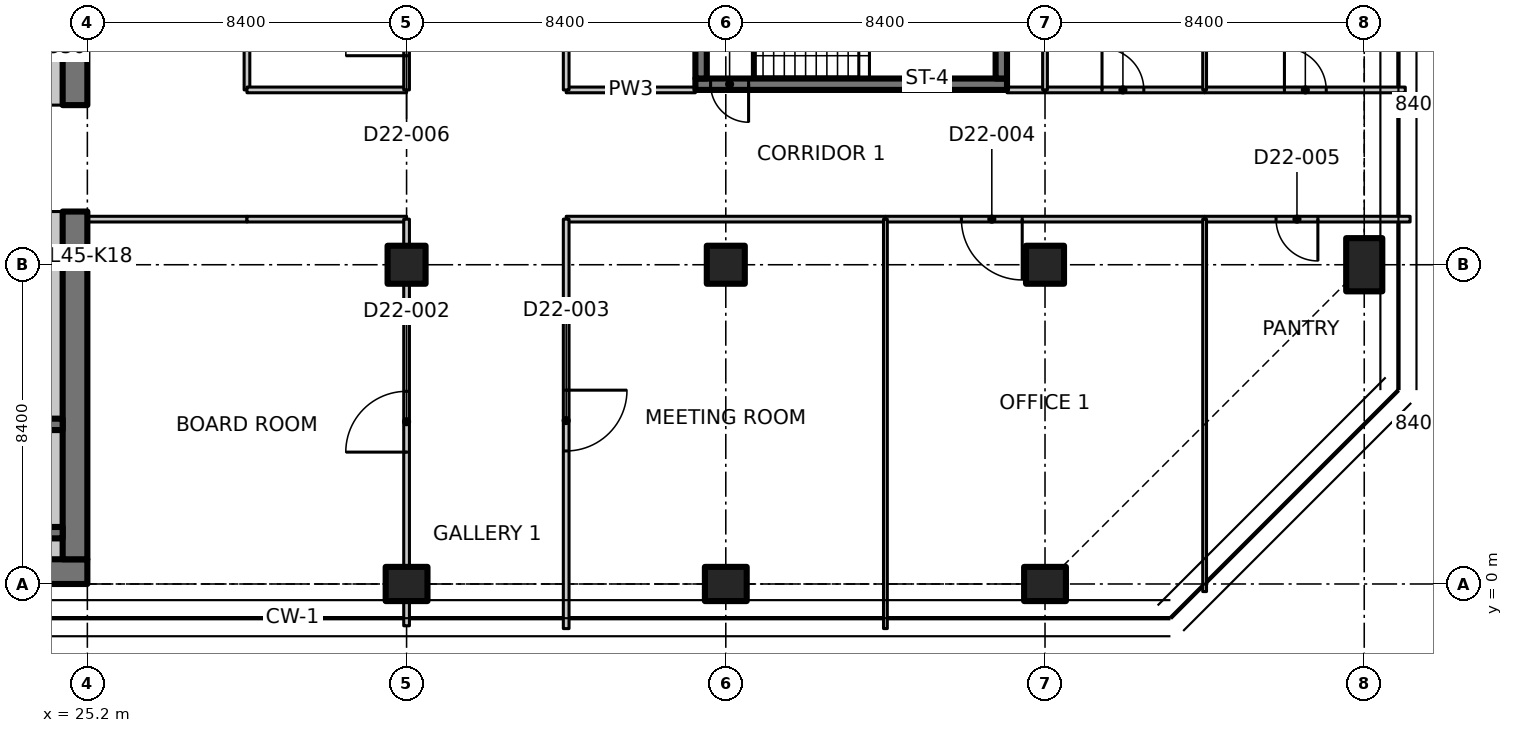
"""IFC4 building model, lengths in metres.
Left out: names, types, materials, properties, quantities, classifications, styles, units other than length and angle.
Written with IfcOpenShell. Run it as: python <this file> out.ifc"""

import sys

from ifc_helpers import new_model, si_unit, direction, frame, frame_2d, origin, origin_2d, place, context, subcontext, project, spatial, polyline, rectangle, outline, extrude, element, fill, save


model = new_model("IFC4")
c1 = context("Model", 3, precision=1e-05, world=origin(), true_north=direction((0.0, 1.0)))
c2 = subcontext(c1, "Body", "Model", "MODEL_VIEW")
j1 = project(units=[si_unit("LENGTHUNIT", "METRE"), si_unit("PLANEANGLEUNIT", "RADIAN")], contexts=[c1])
p1 = place(None, origin())
s1 = spatial("IfcSite", under=j1, at=p1, CompositionType="ELEMENT")
p2 = place(p1, origin())
s2 = spatial("IfcBuilding", under=s1, at=p2, CompositionType="ELEMENT")
p3 = place(p2, frame((0.0, 0.0, 181.2)))
s3 = spatial("IfcBuildingStorey", under=s2, at=p3, CompositionType="ELEMENT", Elevation=181.2)
p4 = place(p3, frame((33.6, 0.0, 0.0), z_axis=(0.0, 0.0, 1.0), x_axis=(0.0, 1.0, 0.0)))
e1 = element("IfcColumn", 1, at=p4, inside=s3, PredefinedType="COLUMN", context=c2, shape_type="SweptSolid", body=[
    extrude(rectangle(XDim=0.9, YDim=1.1, at=origin_2d()), origin(), (0.0, 0.0, 1.0), 3.35),
])
p5 = place(p3, frame((33.6, 8.4, 0.0), z_axis=(0.0, 0.0, 1.0), x_axis=(1.0, 0.0, 0.0)))
e2 = element("IfcColumn", 2, at=p5, inside=s3, PredefinedType="COLUMN", context=c2, shape_type="SweptSolid", body=[
    extrude(rectangle(XDim=1.0, YDim=1.0, at=origin_2d()), origin(), (0.0, 0.0, 1.0), 3.35),
])
p6 = place(p3, frame((42.0, 0.0, 0.0), z_axis=(0.0, 0.0, 1.0), x_axis=(0.0, 1.0, 0.0)))
e3 = element("IfcColumn", 3, at=p6, inside=s3, PredefinedType="COLUMN", context=c2, shape_type="SweptSolid", body=[
    extrude(rectangle(XDim=0.9, YDim=1.1, at=origin_2d()), origin(), (0.0, 0.0, 1.0), 3.35),
])
p7 = place(p3, frame((42.0, 8.4, 0.0), z_axis=(0.0, 0.0, 1.0), x_axis=(1.0, 0.0, 0.0)))
e4 = element("IfcColumn", 4, at=p7, inside=s3, PredefinedType="COLUMN", context=c2, shape_type="SweptSolid", body=[
    extrude(rectangle(XDim=1.0, YDim=1.0, at=origin_2d()), origin(), (0.0, 0.0, 1.0), 3.35),
])
p8 = place(p3, frame((50.4, 0.0, 0.0), z_axis=(0.0, 0.0, 1.0), x_axis=(0.0, 1.0, 0.0)))
e5 = element("IfcColumn", 5, at=p8, inside=s3, PredefinedType="COLUMN", context=c2, shape_type="SweptSolid", body=[
    extrude(rectangle(XDim=0.9, YDim=1.1, at=origin_2d()), origin(), (0.0, 0.0, 1.0), 3.35),
])
p9 = place(p3, frame((50.4, 8.4, 0.0), z_axis=(0.0, 0.0, 1.0), x_axis=(1.0, 0.0, 0.0)))
e6 = element("IfcColumn", 6, at=p9, inside=s3, PredefinedType="COLUMN", context=c2, shape_type="SweptSolid", body=[
    extrude(rectangle(XDim=1.0, YDim=1.0, at=origin_2d()), origin(), (0.0, 0.0, 1.0), 3.35),
])
p10 = place(p3, frame((58.8, 8.4, 0.0), z_axis=(0.0, 0.0, 1.0), x_axis=(1.0, 0.0, 0.0)))
e7 = element("IfcColumn", 7, at=p10, inside=s3, PredefinedType="COLUMN", context=c2, shape_type="SweptSolid", body=[
    extrude(rectangle(XDim=0.95, YDim=1.4, at=origin_2d()), origin(), (0.0, 0.0, 1.0), 3.35),
])
p11 = place(p3, frame((7.286, 0.325, 0.0), z_axis=(0.0, 0.0, 1.0), x_axis=(1.0, 0.0, 0.0)))
e8 = element("IfcWall", 8, at=p11, inside=s3, PredefinedType="SHEAR", context=c2, shape_type="SweptSolid", body=[
    extrude(rectangle(XDim=17.914, YDim=0.65, at=frame_2d((8.957, 0.0))), origin(), (0.0, 0.0, 1.0), 3.35),
])
p12 = place(p3, frame((24.875, 0.65, 0.0), z_axis=(0.0, 0.0, 1.0), x_axis=(0.0, 1.0, 0.0)))
e9 = element("IfcWall", 9, at=p12, inside=s3, PredefinedType="SHEAR", context=c2, shape_type="SweptSolid", body=[
    extrude(rectangle(XDim=9.15, YDim=0.65, at=frame_2d((4.575, 0.0))), origin(), (0.0, 0.0, 1.0), 3.35),
])
p13 = place(p3, frame((24.875, 12.6, 0.0), z_axis=(0.0, 0.0, 1.0), x_axis=(0.0, 1.0, 0.0)))
e10 = element("IfcWall", 10, at=p13, inside=s3, PredefinedType="SHEAR", context=c2, shape_type="SweptSolid", body=[
    extrude(rectangle(XDim=3.55, YDim=0.65, at=frame_2d((1.775, 0.0))), origin(), (0.0, 0.0, 1.0), 3.35),
])
p14 = place(p3, frame((24.275, 12.6, 0.0), z_axis=(0.0, 0.0, 1.0), x_axis=(0.0, 1.0, 0.0)))
e11 = element("IfcWall", 11, at=p14, inside=s3, PredefinedType="PARTITIONING", context=c2, shape_type="SweptSolid", body=[
    extrude(rectangle(XDim=3.0, YDim=0.55, at=frame_2d((1.5, 0.0))), origin(), (0.0, 0.0, 1.0), 3.35),
])
p15 = place(p3, frame((15.8, 1.35, 0.0), z_axis=(0.0, 0.0, 1.0), x_axis=(1.0, 0.0, 0.0)))
e12 = element("IfcWall", 12, at=p15, inside=s3, PredefinedType="SHEAR", context=c2, shape_type="SweptSolid", body=[
    extrude(rectangle(XDim=8.75, YDim=0.3, at=frame_2d((4.375, 0.0))), origin(), (0.0, 0.0, 1.0), 3.35),
])
p16 = place(p3, frame((15.8, 4.2, 0.0), z_axis=(0.0, 0.0, 1.0), x_axis=(1.0, 0.0, 0.0)))
e13 = element("IfcWall", 13, at=p16, inside=s3, PredefinedType="SHEAR", context=c2, shape_type="SweptSolid", body=[
    extrude(rectangle(XDim=8.75, YDim=0.3, at=frame_2d((4.375, 0.0))), origin(), (0.0, 0.0, 1.0), 3.35),
])
p17 = place(p16, frame((0.4, 0.0, 0.0)))
e14 = element("IfcOpeningElement", 14, at=p17, cuts=e13, PredefinedType="OPENING", context=c2, shape_type="SweptSolid", body=[
    extrude(rectangle(XDim=1.0, YDim=2.1, at=frame_2d((0.5, 1.05))), frame((0.0, 0.16, 0.0), z_axis=(0.0, -1.0, 0.0), x_axis=(1.0, 0.0, 0.0)), (0.0, 0.0, 1.0), 0.32),
])
p18 = place(p3, frame((49.4, 13.15, 0.0), z_axis=(0.0, 0.0, 1.0), x_axis=(-1.0, 0.0, 0.0)))
e15 = element("IfcWall", 15, at=p18, inside=s3, PredefinedType="SHEAR", context=c2, shape_type="SweptSolid", body=[
    extrude(rectangle(XDim=8.2, YDim=0.3, at=frame_2d((4.1, 0.0))), origin(), (0.0, 0.0, 1.0), 3.35),
])
p19 = place(p18, frame((6.8, 0.0, 0.0)))
e16 = element("IfcOpeningElement", 16, at=p19, cuts=e15, PredefinedType="OPENING", context=c2, shape_type="SweptSolid", body=[
    extrude(rectangle(XDim=1.0, YDim=2.1, at=frame_2d((0.5, 1.05))), frame((0.0, 0.16, 0.0), z_axis=(0.0, -1.0, 0.0), x_axis=(1.0, 0.0, 0.0)), (0.0, 0.0, 1.0), 0.32),
])
for number, where, z_axis, x_axis in (
    (17, (41.35, 13.3, 0.0), (0.0, 0.0, 1.0), (0.0, 1.0, 0.0)),
    (18, (49.25, 13.3, 0.0), (0.0, 0.0, 1.0), (0.0, 1.0, 0.0)),
):
    element("IfcWall", number, at=place(p3, frame(where, z_axis=z_axis, x_axis=x_axis)), inside=s3, PredefinedType="SHEAR", context=c2, shape_type="SweptSolid", body=[
        extrude(rectangle(XDim=2.55, YDim=0.3, at=frame_2d((1.275, 0.0))), origin(), (0.0, 0.0, 1.0), 3.35),
    ])
p20 = place(p3, frame((13.35, 0.925, 0.0), z_axis=(0.0, 0.0, 1.0), x_axis=(1.0, 0.0, 0.0)))
e19 = element("IfcWall", 19, at=p20, inside=s3, PredefinedType="PARTITIONING", context=c2, shape_type="SweptSolid", body=[
    extrude(rectangle(XDim=11.2, YDim=0.55, at=frame_2d((5.6, 0.0))), origin(), (0.0, 0.0, 1.0), 3.35),
])
p21 = place(p3, frame((24.275, 1.5, 0.0), z_axis=(0.0, 0.0, 1.0), x_axis=(0.0, 1.0, 0.0)))
e20 = element("IfcWall", 20, at=p21, inside=s3, PredefinedType="PARTITIONING", context=c2, shape_type="SweptSolid", body=[
    extrude(rectangle(XDim=2.55, YDim=0.55, at=frame_2d((1.275, 0.0))), origin(), (0.0, 0.0, 1.0), 3.35),
])
p22 = place(p3, frame((24.275, 4.35, 0.0), z_axis=(0.0, 0.0, 1.0), x_axis=(0.0, 1.0, 0.0)))
e21 = element("IfcWall", 21, at=p22, inside=s3, PredefinedType="PARTITIONING", context=c2, shape_type="SweptSolid", body=[
    extrude(rectangle(XDim=5.45, YDim=0.55, at=frame_2d((2.725, 0.0))), origin(), (0.0, 0.0, 1.0), 3.35),
])
p23 = place(p3, frame((29.4, 9.6, 0.0), z_axis=(0.0, 0.0, 1.0), x_axis=(-1.0, 0.0, 0.0)))
e22 = element("IfcWall", 22, at=p23, inside=s3, PredefinedType="PARTITIONING", context=c2, shape_type="SweptSolid", body=[
    extrude(rectangle(XDim=4.2, YDim=0.15, at=frame_2d((2.1, 0.0))), origin(), (0.0, 0.0, 1.0), 3.33),
])
p24 = place(p3, frame((29.4, 21.2, 0.0), z_axis=(0.0, 0.0, 1.0), x_axis=(0.0, -1.0, 0.0)))
e23 = element("IfcWall", 23, at=p24, inside=s3, PredefinedType="PARTITIONING", context=c2, shape_type="SweptSolid", body=[
    extrude(rectangle(XDim=8.2, YDim=0.15, at=frame_2d((4.1, 0.0))), origin(), (0.0, 0.0, 1.0), 3.33),
])
p25 = place(p3, frame((33.6, 9.6, 0.0), z_axis=(0.0, 0.0, 1.0), x_axis=(-1.0, 0.0, 0.0)))
e24 = element("IfcWall", 24, at=p25, inside=s3, PredefinedType="PARTITIONING", context=c2, shape_type="SweptSolid", body=[
    extrude(rectangle(XDim=4.2, YDim=0.15, at=frame_2d((2.1, 0.0))), origin(), (0.0, 0.0, 1.0), 3.33),
])
p26 = place(p3, frame((46.2, 9.6, 0.0), z_axis=(0.0, 0.0, 1.0), x_axis=(-1.0, 0.0, 0.0)))
e25 = element("IfcWall", 25, at=p26, inside=s3, PredefinedType="PARTITIONING", context=c2, shape_type="SweptSolid", body=[
    extrude(rectangle(XDim=8.4, YDim=0.15, at=frame_2d((4.2, 0.0))), origin(), (0.0, 0.0, 1.0), 3.33),
])
p27 = place(p3, frame((54.6, 9.6, 0.0), z_axis=(0.0, 0.0, 1.0), x_axis=(-1.0, 0.0, 0.0)))
e26 = element("IfcWall", 26, at=p27, inside=s3, PredefinedType="PARTITIONING", context=c2, shape_type="SweptSolid", body=[
    extrude(rectangle(XDim=8.4, YDim=0.15, at=frame_2d((4.2, 0.0))), origin(), (0.0, 0.0, 1.0), 3.33),
])
p28 = place(p27, frame((4.8, 0.0, 0.0)))
e27 = element("IfcOpeningElement", 27, at=p28, cuts=e26, PredefinedType="OPENING", context=c2, shape_type="SweptSolid", body=[
    extrude(rectangle(XDim=1.6, YDim=2.1, at=frame_2d((0.8, 1.05))), frame((0.0, 0.085, 0.0), z_axis=(0.0, -1.0, 0.0), x_axis=(1.0, 0.0, 0.0)), (0.0, 0.0, 1.0), 0.17),
])
p29 = place(p3, frame((60.007, 9.6, 0.0), z_axis=(0.0, 0.0, 1.0), x_axis=(-1.0, 0.0, 0.0)))
e28 = element("IfcWall", 28, at=p29, inside=s3, PredefinedType="PARTITIONING", context=c2, shape_type="SweptSolid", body=[
    extrude(outline(polyline([(0.0, 0.0), (5.407, 0.0), (5.407, 3.33), (1.657, 3.33), (1.655, 2.98), (0.759, 2.98), (0.757, 3.33), (0.127, 3.33), (0.0, 3.33), (0.0, 0.0)])), frame((0.0, 0.075, 0.0), z_axis=(0.0, -1.0, 0.0), x_axis=(1.0, 0.0, 0.0)), (0.0, 0.0, 1.0), 0.15),
])
p30 = place(p29, frame((2.427, 0.0, 0.0)))
e29 = element("IfcOpeningElement", 29, at=p30, cuts=e28, PredefinedType="OPENING", context=c2, shape_type="SweptSolid", body=[
    extrude(rectangle(XDim=1.1, YDim=2.1, at=frame_2d((0.55, 1.05))), frame((0.0, 0.085, 0.0), z_axis=(0.0, -1.0, 0.0), x_axis=(1.0, 0.0, 0.0)), (0.0, 0.0, 1.0), 0.17),
])
p31 = place(p3, frame((29.4, 13.0, 0.0), z_axis=(0.0, 0.0, 1.0), x_axis=(1.0, 0.0, 0.0)))
e30 = element("IfcWall", 30, at=p31, inside=s3, PredefinedType="PARTITIONING", context=c2, shape_type="SweptSolid", body=[
    extrude(rectangle(XDim=4.2, YDim=0.15, at=frame_2d((2.1, 0.0))), origin(), (0.0, 0.0, 1.0), 3.33),
])
p32 = place(p3, frame((37.8, 13.0, 0.0), z_axis=(0.0, 0.0, 1.0), x_axis=(1.0, 0.0, 0.0)))
e31 = element("IfcWall", 31, at=p32, inside=s3, PredefinedType="PARTITIONING", context=c2, shape_type="SweptSolid", body=[
    extrude(rectangle(XDim=3.4, YDim=0.15, at=frame_2d((1.7, 0.0))), origin(), (0.0, 0.0, 1.0), 3.33),
])
p33 = place(p3, frame((49.4, 13.0, 0.0), z_axis=(0.0, 0.0, 1.0), x_axis=(1.0, 0.0, 0.0)))
e32 = element("IfcWall", 32, at=p33, inside=s3, PredefinedType="PARTITIONING", context=c2, shape_type="SweptSolid", body=[
    extrude(rectangle(XDim=1.0, YDim=0.15, at=frame_2d((0.5, 0.0))), origin(), (0.0, 0.0, 1.0), 3.33),
])
p34 = place(p3, frame((50.4, 13.0, 0.0), z_axis=(0.0, 0.0, 1.0), x_axis=(1.0, 0.0, 0.0)))
e33 = element("IfcWall", 33, at=p34, inside=s3, PredefinedType="PARTITIONING", context=c2, shape_type="SweptSolid", body=[
    extrude(rectangle(XDim=4.2, YDim=0.15, at=frame_2d((2.1, 0.0))), origin(), (0.0, 0.0, 1.0), 3.33),
])
p35 = place(p34, frame((1.5, 0.0, 0.0)))
e34 = element("IfcOpeningElement", 34, at=p35, cuts=e33, PredefinedType="OPENING", context=c2, shape_type="SweptSolid", body=[
    extrude(rectangle(XDim=1.1, YDim=2.1, at=frame_2d((0.55, 1.05))), frame((0.0, 0.085, 0.0), z_axis=(0.0, -1.0, 0.0), x_axis=(1.0, 0.0, 0.0)), (0.0, 0.0, 1.0), 0.17),
])
p36 = place(p3, frame((54.6, 13.0, 0.0), z_axis=(0.0, 0.0, 1.0), x_axis=(1.0, 0.0, 0.0)))
e35 = element("IfcWall", 35, at=p36, inside=s3, PredefinedType="PARTITIONING", context=c2, shape_type="SweptSolid", body=[
    extrude(outline(polyline([(0.0, 0.0), (5.28, 0.0), (5.28, 3.33), (4.65, 3.33), (4.648, 2.98), (3.752, 2.98), (3.75, 3.33), (0.0, 3.33), (0.0, 0.0)])), frame((0.0, 0.075, 0.0), z_axis=(0.0, -1.0, 0.0), x_axis=(1.0, 0.0, 0.0)), (0.0, 0.0, 1.0), 0.15),
])
p37 = place(p36, frame((2.1, 0.0, 0.0)))
e36 = element("IfcOpeningElement", 36, at=p37, cuts=e35, PredefinedType="OPENING", context=c2, shape_type="SweptSolid", body=[
    extrude(rectangle(XDim=1.1, YDim=2.1, at=frame_2d((0.55, 1.05))), frame((0.0, 0.085, 0.0), z_axis=(0.0, -1.0, 0.0), x_axis=(1.0, 0.0, 0.0)), (0.0, 0.0, 1.0), 0.17),
])
p38 = place(p3, frame((33.6, -1.1, 0.0), z_axis=(0.0, 0.0, 1.0), x_axis=(0.0, 1.0, 0.0)))
e37 = element("IfcWall", 37, at=p38, inside=s3, PredefinedType="PARTITIONING", context=c2, shape_type="SweptSolid", body=[
    extrude(rectangle(XDim=0.63, YDim=0.15, at=frame_2d((0.315, 0.0))), origin(), (0.0, 0.0, 1.0), 3.33),
])
p39 = place(p3, frame((33.6, 0.47, 0.0), z_axis=(0.0, 0.0, 1.0), x_axis=(0.0, 1.0, 0.0)))
e38 = element("IfcWall", 38, at=p39, inside=s3, PredefinedType="PARTITIONING", context=c2, shape_type="SweptSolid", body=[
    extrude(rectangle(XDim=7.41, YDim=0.15, at=frame_2d((3.705, 0.0))), origin(), (0.0, 0.0, 1.0), 3.33),
])
p40 = place(p39, frame((3.0, 0.0, 0.0)))
e39 = element("IfcOpeningElement", 39, at=p40, cuts=e38, PredefinedType="OPENING", context=c2, shape_type="SweptSolid", body=[
    extrude(rectangle(XDim=1.6, YDim=2.1, at=frame_2d((0.8, 1.05))), frame((0.0, 0.085, 0.0), z_axis=(0.0, -1.0, 0.0), x_axis=(1.0, 0.0, 0.0)), (0.0, 0.0, 1.0), 0.17),
])
p41 = place(p3, frame((33.6, 8.92, 0.0), z_axis=(0.0, 0.0, 1.0), x_axis=(0.0, 1.0, 0.0)))
e40 = element("IfcWall", 40, at=p41, inside=s3, PredefinedType="PARTITIONING", context=c2, shape_type="SweptSolid", body=[
    extrude(rectangle(XDim=0.68, YDim=0.15, at=frame_2d((0.34, 0.0))), origin(), (0.0, 0.0, 1.0), 3.33),
])
p42 = place(p3, frame((37.8, 9.6, 0.0), z_axis=(0.0, 0.0, 1.0), x_axis=(0.0, -1.0, 0.0)))
e41 = element("IfcWall", 41, at=p42, inside=s3, PredefinedType="PARTITIONING", context=c2, shape_type="SweptSolid", body=[
    extrude(outline(polyline([(0.0, 0.0), (10.774, 0.0), (10.774, 3.33), (10.7, 3.33), (10.05, 3.33), (10.048, 2.98), (9.152, 2.98), (9.15, 3.33), (0.0, 3.33), (0.0, 0.0)])), frame((0.0, 0.075, 0.0), z_axis=(0.0, -1.0, 0.0), x_axis=(1.0, 0.0, 0.0)), (0.0, 0.0, 1.0), 0.15),
])
p43 = place(p42, frame((4.5, 0.0, 0.0)))
e42 = element("IfcOpeningElement", 42, at=p43, cuts=e41, PredefinedType="OPENING", context=c2, shape_type="SweptSolid", body=[
    extrude(rectangle(XDim=1.6, YDim=2.1, at=frame_2d((0.8, 1.05))), frame((0.0, 0.085, 0.0), z_axis=(0.0, -1.0, 0.0), x_axis=(1.0, 0.0, 0.0)), (0.0, 0.0, 1.0), 0.17),
])
p44 = place(p3, frame((46.2, 9.6, 0.0), z_axis=(0.0, 0.0, 1.0), x_axis=(0.0, -1.0, 0.0)))
e43 = element("IfcWall", 43, at=p44, inside=s3, PredefinedType="PARTITIONING", context=c2, shape_type="SweptSolid", body=[
    extrude(outline(polyline([(0.0, 0.0), (10.774, 0.0), (10.774, 3.33), (10.7, 3.33), (10.05, 3.33), (10.048, 2.98), (9.152, 2.98), (9.15, 3.33), (0.0, 3.33), (0.0, 0.0)])), frame((0.0, 0.05, 0.0), z_axis=(0.0, -1.0, 0.0), x_axis=(1.0, 0.0, 0.0)), (0.0, 0.0, 1.0), 0.1),
])
p45 = place(p3, frame((54.6, 9.6, 0.0), z_axis=(0.0, 0.0, 1.0), x_axis=(0.0, -1.0, 0.0)))
e44 = element("IfcWall", 44, at=p45, inside=s3, PredefinedType="PARTITIONING", context=c2, shape_type="SweptSolid", body=[
    extrude(outline(polyline([(0.0, 0.0), (9.8, 0.0), (9.8, 3.33), (6.066, 3.33), (6.064, 2.98), (4.736, 2.98), (4.734, 3.33), (0.0, 3.33), (0.0, 0.0)])), frame((0.0, 0.05, 0.0), z_axis=(0.0, -1.0, 0.0), x_axis=(1.0, 0.0, 0.0)), (0.0, 0.0, 1.0), 0.1),
])
p46 = place(p3, frame((33.6, 13.0, 0.0), z_axis=(0.0, 0.0, 1.0), x_axis=(0.0, 1.0, 0.0)))
e45 = element("IfcWall", 45, at=p46, inside=s3, PredefinedType="PARTITIONING", context=c2, shape_type="SweptSolid", body=[
    extrude(rectangle(XDim=3.28, YDim=0.15, at=frame_2d((1.64, 0.0))), origin(), (0.0, 0.0, 1.0), 3.33),
])
p47 = place(p46, frame((0.9, 0.0, 0.0)))
e46 = element("IfcOpeningElement", 46, at=p47, cuts=e45, PredefinedType="OPENING", context=c2, shape_type="SweptSolid", body=[
    extrude(rectangle(XDim=1.6, YDim=2.1, at=frame_2d((0.8, 1.05))), frame((0.0, 0.085, 0.0), z_axis=(0.0, -1.0, 0.0), x_axis=(1.0, 0.0, 0.0)), (0.0, 0.0, 1.0), 0.17),
])
p48 = place(p3, frame((37.8, 30.526, 0.0), z_axis=(0.0, 0.0, 1.0), x_axis=(0.0, -1.0, 0.0)))
e47 = element("IfcWall", 47, at=p48, inside=s3, PredefinedType="PARTITIONING", context=c2, shape_type="SweptSolid", body=[
    extrude(outline(polyline([(0.0, 0.0), (17.526, 0.0), (17.526, 3.33), (5.776, 3.33), (5.774, 2.98), (4.878, 2.98), (4.876, 3.33), (0.283, 3.33), (0.0, 3.33), (0.0, 0.0)])), frame((0.0, 0.075, 0.0), z_axis=(0.0, -1.0, 0.0), x_axis=(1.0, 0.0, 0.0)), (0.0, 0.0, 1.0), 0.15),
])
p49 = place(p48, frame((8.283, 0.0, 0.0)))
e48 = element("IfcOpeningElement", 48, at=p49, cuts=e47, PredefinedType="OPENING", context=c2, shape_type="SweptSolid", body=[
    extrude(rectangle(XDim=1.6, YDim=2.1, at=frame_2d((0.8, 1.05))), frame((0.0, 0.085, 0.0), z_axis=(0.0, -1.0, 0.0), x_axis=(1.0, 0.0, 0.0)), (0.0, 0.0, 1.0), 0.17),
])
p50 = place(p3, frame((50.4, 16.28, 0.0), z_axis=(0.0, 0.0, 1.0), x_axis=(0.0, -1.0, 0.0)))
e49 = element("IfcWall", 49, at=p50, inside=s3, PredefinedType="PARTITIONING", context=c2, shape_type="SweptSolid", body=[
    extrude(rectangle(XDim=3.28, YDim=0.125, at=frame_2d((1.64, 0.0))), origin(), (0.0, 0.0, 1.0), 3.33),
])
p51 = place(p3, frame((54.6, 25.805, 0.0), z_axis=(0.0, 0.0, 1.0), x_axis=(0.0, -1.0, 0.0)))
e50 = element("IfcWall", 50, at=p51, inside=s3, PredefinedType="PARTITIONING", context=c2, shape_type="SweptSolid", body=[
    extrude(outline(polyline([(0.0, 0.0), (12.805, 0.0), (12.805, 3.33), (5.471, 3.33), (5.469, 2.98), (4.142, 2.98), (4.14, 3.33), (0.406, 3.33), (0.0, 3.33), (0.0, 0.0)])), frame((0.0, 0.05, 0.0), z_axis=(0.0, -1.0, 0.0), x_axis=(1.0, 0.0, 0.0)), (0.0, 0.0, 1.0), 0.1),
])
p52 = place(p19, origin())
e51 = element("IfcDoor", 51, at=p52, inside=s3, OperationType="SINGLE_SWING_RIGHT", PredefinedType="DOOR", context=c2, shape_type="SweptSolid", body=[
    extrude(rectangle(XDim=1.0, YDim=2.1, at=frame_2d((0.5, 1.05))), frame((0.0, 0.025, 0.0), z_axis=(0.0, -1.0, 0.0), x_axis=(1.0, 0.0, 0.0)), (0.0, 0.0, 1.0), 0.05),
])
fill(e16, e51)
p53 = place(p40, origin())
e52 = element("IfcDoor", 52, at=p53, inside=s3, OperationType="DOUBLE_DOOR_SINGLE_SWING", PredefinedType="DOOR", context=c2, shape_type="SweptSolid", body=[
    extrude(rectangle(XDim=1.6, YDim=2.1, at=frame_2d((0.8, 1.05))), frame((0.0, 0.025, 0.0), z_axis=(0.0, -1.0, 0.0), x_axis=(1.0, 0.0, 0.0)), (0.0, 0.0, 1.0), 0.05),
])
fill(e39, e52)
p54 = place(p43, origin())
e53 = element("IfcDoor", 53, at=p54, inside=s3, OperationType="DOUBLE_DOOR_SINGLE_SWING", PredefinedType="DOOR", context=c2, shape_type="SweptSolid", body=[
    extrude(rectangle(XDim=1.6, YDim=2.1, at=frame_2d((0.8, 1.05))), frame((0.0, 0.025, 0.0), z_axis=(0.0, -1.0, 0.0), x_axis=(1.0, 0.0, 0.0)), (0.0, 0.0, 1.0), 0.05),
])
fill(e42, e53)
p55 = place(p28, origin())
e54 = element("IfcDoor", 54, at=p55, inside=s3, OperationType="DOUBLE_DOOR_SINGLE_SWING", PredefinedType="DOOR", context=c2, shape_type="SweptSolid", body=[
    extrude(rectangle(XDim=1.6, YDim=2.1, at=frame_2d((0.8, 1.05))), frame((0.0, 0.025, 0.0), z_axis=(0.0, -1.0, 0.0), x_axis=(1.0, 0.0, 0.0)), (0.0, 0.0, 1.0), 0.05),
])
fill(e27, e54)
p56 = place(p30, origin())
e55 = element("IfcDoor", 55, at=p56, inside=s3, OperationType="SINGLE_SWING_LEFT", PredefinedType="DOOR", context=c2, shape_type="SweptSolid", body=[
    extrude(rectangle(XDim=1.1, YDim=2.1, at=frame_2d((0.55, 1.05))), frame((0.0, 0.025, 0.0), z_axis=(0.0, -1.0, 0.0), x_axis=(1.0, 0.0, 0.0)), (0.0, 0.0, 1.0), 0.05),
])
fill(e29, e55)
p57 = place(p47, origin())
e56 = element("IfcDoor", 56, at=p57, inside=s3, OperationType="DOUBLE_DOOR_SINGLE_SWING", PredefinedType="DOOR", context=c2, shape_type="SweptSolid", body=[
    extrude(rectangle(XDim=1.6, YDim=2.1, at=frame_2d((0.8, 1.05))), frame((0.0, 0.025, 0.0), z_axis=(0.0, -1.0, 0.0), x_axis=(1.0, 0.0, 0.0)), (0.0, 0.0, 1.0), 0.05),
])
fill(e46, e56)
p58 = place(p35, origin())
e57 = element("IfcDoor", 57, at=p58, inside=s3, OperationType="SINGLE_SWING_LEFT", PredefinedType="DOOR", context=c2, shape_type="SweptSolid", body=[
    extrude(rectangle(XDim=1.1, YDim=2.1, at=frame_2d((0.55, 1.05))), frame((0.0, 0.025, 0.0), z_axis=(0.0, -1.0, 0.0), x_axis=(1.0, 0.0, 0.0)), (0.0, 0.0, 1.0), 0.05),
])
fill(e34, e57)
p59 = place(p37, origin())
e58 = element("IfcDoor", 58, at=p59, inside=s3, OperationType="SINGLE_SWING_LEFT", PredefinedType="DOOR", context=c2, shape_type="SweptSolid", body=[
    extrude(rectangle(XDim=1.1, YDim=2.1, at=frame_2d((0.55, 1.05))), frame((0.0, 0.025, 0.0), z_axis=(0.0, -1.0, 0.0), x_axis=(1.0, 0.0, 0.0)), (0.0, 0.0, 1.0), 0.05),
])
fill(e36, e58)
save(model, sys.argv[1])
